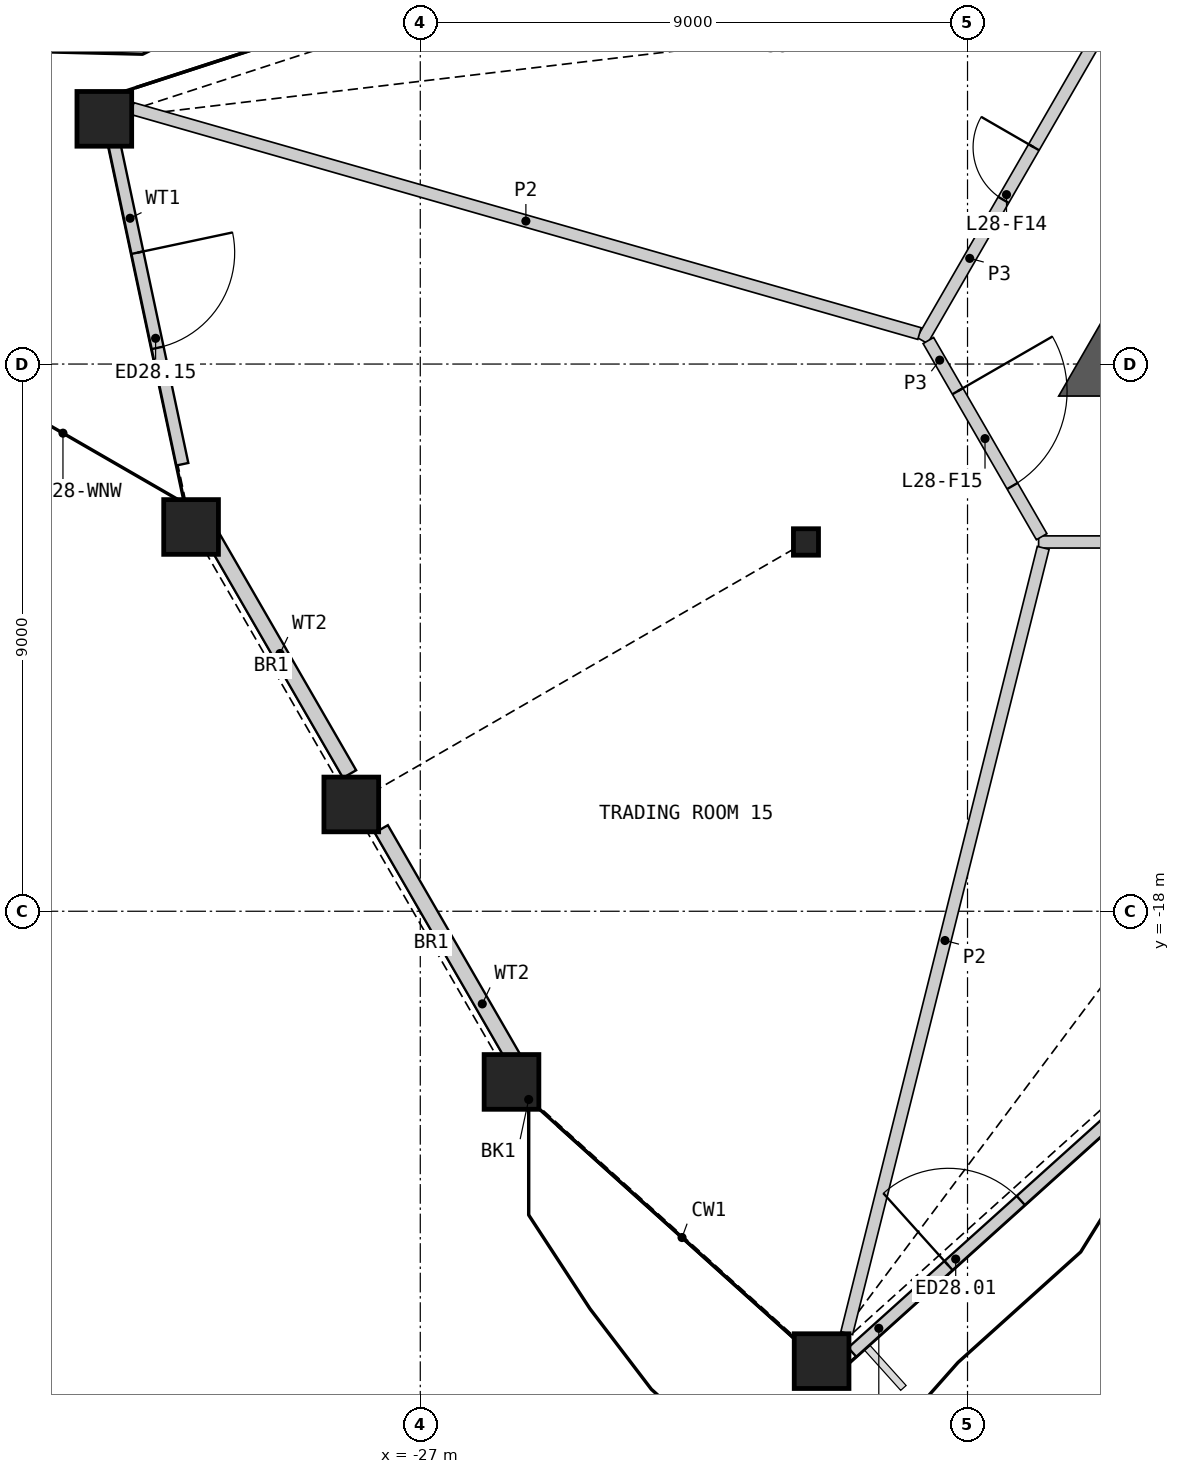
"""IFC4 building model, lengths in metres.
Left out: names, types, materials, properties, quantities, classifications, styles, units other than length and angle.
Written with IfcOpenShell. Run it as: python <this file> out.ifc"""

import sys

from ifc_helpers import new_model, si_unit, direction, frame, frame_2d, origin, origin_2d, place, context, subcontext, project, spatial, polyline, rectangle, hollow_rectangle, i_section, outline, extrude, element, fill, save


model = new_model("IFC4")
c1 = context("Model", 3, precision=1e-05, world=origin(), true_north=direction((0.0, 1.0)))
c2 = subcontext(c1, "Body", "Model", "MODEL_VIEW")
j1 = project(units=[si_unit("LENGTHUNIT", "METRE"), si_unit("PLANEANGLEUNIT", "RADIAN")], contexts=[c1])
p1 = place(None, origin())
s1 = spatial("IfcSite", under=j1, at=p1, CompositionType="ELEMENT")
p2 = place(p1, origin())
s2 = spatial("IfcBuilding", under=s1, at=p2, CompositionType="ELEMENT")
p3 = place(p2, frame((0.0, 0.0, 133.2)))
s3 = spatial("IfcBuildingStorey", under=s2, at=p3, CompositionType="ELEMENT", Elevation=133.2)
for number, where, z_axis, x_axis in (
    (1, (-25.5, -20.807, 0.0), (0.0, 0.0, 1.0), (1.0, 0.0, 0.0)),
    (2, (-20.4, -25.399, 0.0), (0.0, 0.0, 1.0), (1.0, 0.0, 0.0)),
    (3, (-32.196, -4.967, 0.0), (0.0, 0.0, 1.0), (1.0, 0.0, 0.0)),
    (4, (-30.769, -11.68, 0.0), (0.0, 0.0, 1.0), (1.0, 0.0, 0.0)),
    (5, (-28.135, -16.243, 0.0), (0.0, 0.0, 1.0), (1.0, 0.0, 0.0)),
):
    element("IfcColumn", number, at=place(p3, frame(where, z_axis=z_axis, x_axis=x_axis)), inside=s3, PredefinedType="COLUMN", context=c2, shape_type="SweptSolid", body=[
        extrude(hollow_rectangle(XDim=0.9, YDim=0.9, WallThickness=0.06, at=origin_2d()), origin(), (0.0, 0.0, 1.0), 4.2),
    ])
p4 = place(p3, frame((-20.657, -11.926, 0.0), z_axis=(0.0, 0.0, 1.0), x_axis=(1.0, 0.0, 0.0)))
e6 = element("IfcColumn", 6, at=p4, inside=s3, PredefinedType="COLUMN", context=c2, shape_type="SweptSolid", body=[
    extrude(i_section(OverallWidth=0.412, OverallDepth=0.435, WebThickness=0.036, FlangeThickness=0.057, at=origin_2d()), origin(), (0.0, 0.0, 1.0), 4.2),
])
p5 = place(p3, frame((-19.896, -25.253, 0.0), z_axis=(0.0, 0.0, 1.0), x_axis=(0.743157926671, 0.669116055723, 0.0)))
e7 = element("IfcWall", 7, at=p5, inside=s3, PredefinedType="SOLIDWALL", context=c2, shape_type="SweptSolid", body=[
    extrude(rectangle(XDim=5.882, YDim=0.2, at=frame_2d((2.941, 0.0))), origin(), (0.0, 0.0, 1.0), 3.189),
])
p6 = place(p5, frame((2.13, 0.0, 0.0)))
e8 = element("IfcOpeningElement", 8, at=p6, cuts=e7, PredefinedType="OPENING", context=c2, shape_type="SweptSolid", body=[
    extrude(rectangle(XDim=1.6, YDim=2.4, at=frame_2d((0.8, 1.2))), frame((0.0, 0.11, 0.0), z_axis=(0.0, -1.0, 0.0), x_axis=(1.0, 0.0, 0.0)), (0.0, 0.0, 1.0), 0.22),
])
p7 = place(p3, frame((-32.059, -5.254, 0.0), z_axis=(0.0, 0.0, 1.0), x_axis=(0.207902173992, -0.978149623549, 0.0)))
e9 = element("IfcWall", 9, at=p7, inside=s3, PredefinedType="SOLIDWALL", context=c2, shape_type="SweptSolid", body=[
    extrude(rectangle(XDim=5.515, YDim=0.2, at=frame_2d((2.757, 0.0))), origin(), (0.0, 0.0, 1.0), 3.189),
])
p8 = place(p7, frame((1.957, 0.0, 0.0)))
e10 = element("IfcOpeningElement", 10, at=p8, cuts=e9, PredefinedType="OPENING", context=c2, shape_type="SweptSolid", body=[
    extrude(rectangle(XDim=1.6, YDim=2.4, at=frame_2d((0.8, 1.2))), frame((0.0, 0.11, 0.0), z_axis=(0.0, -1.0, 0.0), x_axis=(1.0, 0.0, 0.0)), (0.0, 0.0, 1.0), 0.22),
])
p9 = place(p3, frame((-30.452, -11.779, 0.0), z_axis=(0.0, 0.0, 1.0), x_axis=(0.500016357846, -0.866015959371, 0.0)))
e11 = element("IfcWall", 11, at=p9, inside=s3, PredefinedType="SOLIDWALL", context=c2, shape_type="SweptSolid", body=[
    extrude(rectangle(XDim=4.578, YDim=0.25, at=frame_2d((2.289, 0.0))), origin(), (0.0, 0.0, 1.0), 3.189),
])
p10 = place(p3, frame((-27.641, -16.647, 0.0), z_axis=(0.0, 0.0, 1.0), x_axis=(0.499968989506, -0.866043306961, 0.0)))
e12 = element("IfcWall", 12, at=p10, inside=s3, PredefinedType="SOLIDWALL", context=c2, shape_type="SweptSolid", body=[
    extrude(rectangle(XDim=4.429, YDim=0.25, at=frame_2d((2.214, 0.0))), origin(), (0.0, 0.0, 1.0), 3.189),
])
p11 = place(p3, origin())
e13 = element("IfcWall", 13, at=p11, inside=s3, PredefinedType="SHEAR", context=c2, shape_type="SweptSolid", body=[
    extrude(outline(polyline([(-14.941, -8.626), (-14.941, -9.526), (-16.5, -9.526), (-15.721, -8.176), (-14.941, -8.626)])), origin(), (0.0, 0.0, 1.0), 3.8),
])
p12 = place(p3, frame((-16.831, -11.926, 0.0), z_axis=(0.0, 0.0, 1.0), x_axis=(1.0, 0.0, 0.0)))
e14 = element("IfcWall", 14, at=p12, inside=s3, PredefinedType="PARTITIONING", context=c2, shape_type="SweptSolid", body=[
    extrude(rectangle(XDim=6.275, YDim=0.2, at=frame_2d((3.137, 0.0))), origin(), (0.0, 0.0, 1.0), 3.8),
])
p13 = place(p12, frame((2.688, 0.0, 0.0)))
e15 = element("IfcOpeningElement", 15, at=p13, cuts=e14, PredefinedType="OPENING", context=c2, shape_type="SweptSolid", body=[
    extrude(rectangle(XDim=1.0, YDim=2.1, at=frame_2d((0.5, 1.05))), frame((0.0, 0.11, 0.0), z_axis=(0.0, -1.0, 0.0), x_axis=(1.0, 0.0, 0.0)), (0.0, 0.0, 1.0), 0.22),
])
p14 = place(p3, frame((-18.744, -8.613, 0.0), z_axis=(0.0, 0.0, 1.0), x_axis=(0.499997920671, 0.866026604282, 0.0)))
e16 = element("IfcWall", 16, at=p14, inside=s3, PredefinedType="PARTITIONING", context=c2, shape_type="SweptSolid", body=[
    extrude(rectangle(XDim=6.24, YDim=0.2, at=frame_2d((3.12, 0.0))), origin(), (0.0, 0.0, 1.0), 3.8),
])
p15 = place(p14, frame((2.67, 0.0, 0.0)))
e17 = element("IfcOpeningElement", 17, at=p15, cuts=e16, PredefinedType="OPENING", context=c2, shape_type="SweptSolid", body=[
    extrude(rectangle(XDim=1.0, YDim=2.1, at=frame_2d((0.5, 1.05))), frame((0.0, 0.11, 0.0), z_axis=(0.0, -1.0, 0.0), x_axis=(1.0, 0.0, 0.0)), (0.0, 0.0, 1.0), 0.22),
])
p16 = place(p3, frame((-18.644, -8.613, 0.0), z_axis=(0.0, 0.0, 1.0), x_axis=(0.499958791762, -0.866049194065, 0.0)))
e18 = element("IfcWall", 18, at=p16, inside=s3, PredefinedType="PARTITIONING", context=c2, shape_type="SweptSolid", body=[
    extrude(rectangle(XDim=3.726, YDim=0.2, at=frame_2d((1.863, 0.0))), origin(), (0.0, 0.0, 1.0), 3.8),
])
p17 = place(p16, frame((0.963, 0.0, 0.0)))
e19 = element("IfcOpeningElement", 19, at=p17, cuts=e18, PredefinedType="OPENING", context=c2, shape_type="SweptSolid", body=[
    extrude(rectangle(XDim=1.8, YDim=2.1, at=frame_2d((0.9, 1.05))), frame((0.0, 0.11, 0.0), z_axis=(0.0, -1.0, 0.0), x_axis=(1.0, 0.0, 0.0)), (0.0, 0.0, 1.0), 0.22),
])
p18 = place(p3, frame((-31.736, -4.798, 0.0), z_axis=(0.0, 0.0, 1.0), x_axis=(0.961478776026, -0.274879179372, 0.0)))
e20 = element("IfcWall", 20, at=p18, inside=s3, PredefinedType="PARTITIONING", context=c2, shape_type="SweptSolid", body=[
    extrude(rectangle(XDim=13.465, YDim=0.2, at=frame_2d((6.732, 0.0))), origin(), (0.0, 0.0, 1.0), 2.885),
])
p19 = place(p3, frame((-19.987, -24.939, 0.0), z_axis=(0.0, 0.0, 1.0), x_axis=(0.242708204495, 0.97009933897, 0.0)))
e21 = element("IfcWall", 21, at=p19, inside=s3, PredefinedType="PARTITIONING", context=c2, shape_type="SweptSolid", body=[
    extrude(rectangle(XDim=13.314, YDim=0.2, at=frame_2d((6.657, 0.0))), origin(), (0.0, 0.0, 1.0), 2.885),
])
p20 = place(p6, origin())
e22 = element("IfcDoor", 22, at=p20, inside=s3, OperationType="DOUBLE_DOOR_SINGLE_SWING", PredefinedType="DOOR", context=c2, shape_type="SweptSolid", body=[
    extrude(rectangle(XDim=1.6, YDim=2.4, at=frame_2d((0.8, 1.2))), frame((0.0, 0.025, 0.0), z_axis=(0.0, -1.0, 0.0), x_axis=(1.0, 0.0, 0.0)), (0.0, 0.0, 1.0), 0.05),
])
fill(e8, e22)
p21 = place(p8, origin())
e23 = element("IfcDoor", 23, at=p21, inside=s3, OperationType="DOUBLE_DOOR_SINGLE_SWING", PredefinedType="DOOR", context=c2, shape_type="SweptSolid", body=[
    extrude(rectangle(XDim=1.6, YDim=2.4, at=frame_2d((0.8, 1.2))), frame((0.0, 0.025, 0.0), z_axis=(0.0, -1.0, 0.0), x_axis=(1.0, 0.0, 0.0)), (0.0, 0.0, 1.0), 0.05),
])
fill(e10, e23)
p22 = place(p15, origin())
e24 = element("IfcDoor", 24, at=p22, inside=s3, OperationType="SINGLE_SWING_RIGHT", PredefinedType="DOOR", context=c2, shape_type="SweptSolid", body=[
    extrude(rectangle(XDim=1.0, YDim=2.1, at=frame_2d((0.5, 1.05))), frame((0.0, 0.025, 0.0), z_axis=(0.0, -1.0, 0.0), x_axis=(1.0, 0.0, 0.0)), (0.0, 0.0, 1.0), 0.05),
])
fill(e17, e24)
p23 = place(p17, origin())
e25 = element("IfcDoor", 25, at=p23, inside=s3, OperationType="DOUBLE_DOOR_SINGLE_SWING", PredefinedType="DOOR", context=c2, shape_type="SweptSolid", body=[
    extrude(rectangle(XDim=1.8, YDim=2.1, at=frame_2d((0.9, 1.05))), frame((0.0, 0.025, 0.0), z_axis=(0.0, -1.0, 0.0), x_axis=(1.0, 0.0, 0.0)), (0.0, 0.0, 1.0), 0.05),
])
fill(e19, e25)
save(model, sys.argv[1])
